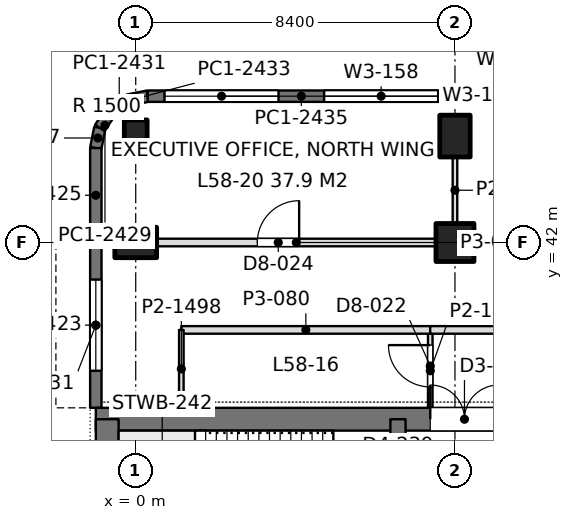
"""IFC4 building model, lengths in metres.
Left out: names, types, materials, properties, quantities, classifications, styles, units other than length and angle.
Written with IfcOpenShell. Run it as: python <this file> out.ifc"""

import sys

from ifc_helpers import new_model, si_unit, direction, frame, frame_2d, origin, origin_2d, place, context, subcontext, project, spatial, rectangle, extrude, element, fill, save


model = new_model("IFC4")
c1 = context("Model", 3, precision=1e-05, world=origin(), true_north=direction((0.0, 1.0)))
c2 = subcontext(c1, "Body", "Model", "MODEL_VIEW")
j1 = project(units=[si_unit("LENGTHUNIT", "METRE"), si_unit("PLANEANGLEUNIT", "RADIAN")], contexts=[c1])
p1 = place(None, origin())
s1 = spatial("IfcSite", under=j1, at=p1, CompositionType="ELEMENT")
p2 = place(p1, origin())
s2 = spatial("IfcBuilding", under=s1, at=p2, CompositionType="ELEMENT")
p3 = place(p2, frame((0.0, 0.0, 254.7)))
s3 = spatial("IfcBuildingStorey", under=s2, at=p3, CompositionType="ELEMENT", Elevation=254.7)
p4 = place(p3, frame((0.0, 42.0, 0.0), z_axis=(0.0, 0.0, 1.0), x_axis=(0.0, 1.0, 0.0)))
e1 = element("IfcColumn", 1, at=p4, inside=s3, PredefinedType="COLUMN", context=c2, shape_type="SweptSolid", body=[
    extrude(rectangle(XDim=0.8, YDim=1.1, at=origin_2d()), origin(), (0.0, 0.0, 1.0), 4.5),
])
p5 = place(p3, frame((0.0, 44.8, 0.0), z_axis=(0.0, 0.0, 1.0), x_axis=(1.0, 0.0, 0.0)))
e2 = element("IfcColumn", 2, at=p5, inside=s3, PredefinedType="COLUMN", context=c2, shape_type="SweptSolid", body=[
    extrude(rectangle(XDim=0.6, YDim=0.85, at=origin_2d()), origin(), (0.0, 0.0, 1.0), 4.5),
])
p6 = place(p3, frame((8.4, 42.0, 0.0), z_axis=(0.0, 0.0, 1.0), x_axis=(1.0, 0.0, 0.0)))
e3 = element("IfcColumn", 3, at=p6, inside=s3, PredefinedType="COLUMN", context=c2, shape_type="SweptSolid", body=[
    extrude(rectangle(XDim=1.0, YDim=1.0, at=origin_2d()), origin(), (0.0, 0.0, 1.0), 4.5),
])
p7 = place(p3, frame((8.4, 44.8, 0.0), z_axis=(0.0, 0.0, 1.0), x_axis=(1.0, 0.0, 0.0)))
e4 = element("IfcColumn", 4, at=p7, inside=s3, PredefinedType="COLUMN", context=c2, shape_type="SweptSolid", body=[
    extrude(rectangle(XDim=0.8, YDim=1.1, at=origin_2d()), origin(), (0.0, 0.0, 1.0), 4.5),
])
p8 = place(p3, frame((-1.05, 37.35, 0.0), z_axis=(0.0, 0.0, 1.0), x_axis=(1.0, 0.0, 0.0)))
e5 = element("IfcWall", 5, at=p8, inside=s3, PredefinedType="SHEAR", context=c2, shape_type="SweptSolid", body=[
    extrude(rectangle(XDim=17.7, YDim=0.6, at=frame_2d((8.85, 0.0))), origin(), (0.0, 0.0, 1.0), 4.5),
])
p9 = place(p8, frame((8.8, 0.0, 0.0)))
e6 = element("IfcOpeningElement", 6, at=p9, cuts=e5, PredefinedType="OPENING", context=c2, shape_type="SweptSolid", body=[
    extrude(rectangle(XDim=1.8, YDim=2.4, at=frame_2d((0.9, 1.2))), frame((0.0, 0.31, 0.0), z_axis=(0.0, -1.0, 0.0), x_axis=(1.0, 0.0, 0.0)), (0.0, 0.0, 1.0), 0.62),
])
p10 = place(p3, frame((-0.75, 13.05, 0.0), z_axis=(0.0, 0.0, 1.0), x_axis=(0.0, 1.0, 0.0)))
e7 = element("IfcWall", 7, at=p10, inside=s3, PredefinedType="SHEAR", context=c2, shape_type="SweptSolid", body=[
    extrude(rectangle(XDim=24.3, YDim=0.6, at=frame_2d((12.15, 0.0))), origin(), (0.0, 0.0, 1.0), 4.5),
])
p11 = place(p3, frame((6.9, 13.05, 0.0), z_axis=(0.0, 0.0, 1.0), x_axis=(0.0, 1.0, 0.0)))
e8 = element("IfcWall", 8, at=p11, inside=s3, PredefinedType="SHEAR", context=c2, shape_type="SweptSolid", body=[
    extrude(rectangle(XDim=24.3, YDim=0.4, at=frame_2d((12.15, 0.0))), origin(), (0.0, 0.0, 1.0), 4.5),
])
p12 = place(p11, frame((1.3, 0.0, 0.0)))
e9 = element("IfcOpeningElement", 9, at=p12, cuts=e8, PredefinedType="OPENING", context=c2, shape_type="SweptSolid", body=[
    extrude(rectangle(XDim=1.0, YDim=2.2, at=frame_2d((0.5, 1.1))), frame((0.0, 0.21, 0.0), z_axis=(0.0, -1.0, 0.0), x_axis=(1.0, 0.0, 0.0)), (0.0, 0.0, 1.0), 0.42),
])
p13 = place(p11, frame((22.0, 0.0, 0.0)))
e10 = element("IfcOpeningElement", 10, at=p13, cuts=e8, PredefinedType="OPENING", context=c2, shape_type="SweptSolid", body=[
    extrude(rectangle(XDim=1.0, YDim=2.2, at=frame_2d((0.5, 1.1))), frame((0.0, 0.21, 0.0), z_axis=(0.0, -1.0, 0.0), x_axis=(1.0, 0.0, 0.0)), (0.0, 0.0, 1.0), 0.42),
])
p14 = place(p11, frame((5.55, 0.0, 0.0)))
e11 = element("IfcOpeningElement", 11, at=p14, cuts=e8, PredefinedType="OPENING", context=c2, shape_type="SweptSolid", body=[
    extrude(rectangle(XDim=1.0, YDim=2.2, at=frame_2d((0.5, 1.1))), frame((0.0, 0.21, 0.0), z_axis=(0.0, -1.0, 0.0), x_axis=(1.0, 0.0, 0.0)), (0.0, 0.0, 1.0), 0.42),
])
p15 = place(p11, frame((9.55, 0.0, 0.0)))
e12 = element("IfcOpeningElement", 12, at=p15, cuts=e8, PredefinedType="OPENING", context=c2, shape_type="SweptSolid", body=[
    extrude(rectangle(XDim=1.0, YDim=2.2, at=frame_2d((0.5, 1.1))), frame((0.0, 0.21, 0.0), z_axis=(0.0, -1.0, 0.0), x_axis=(1.0, 0.0, 0.0)), (0.0, 0.0, 1.0), 0.42),
])
p16 = place(p11, frame((12.8, 0.0, 0.0)))
e13 = element("IfcOpeningElement", 13, at=p16, cuts=e8, PredefinedType="OPENING", context=c2, shape_type="SweptSolid", body=[
    extrude(rectangle(XDim=1.1, YDim=2.2, at=frame_2d((0.55, 1.1))), frame((0.0, 0.21, 0.0), z_axis=(0.0, -1.0, 0.0), x_axis=(1.0, 0.0, 0.0)), (0.0, 0.0, 1.0), 0.42),
])
p17 = place(p11, frame((15.538, 0.0, 0.0)))
e14 = element("IfcOpeningElement", 14, at=p17, cuts=e8, PredefinedType="OPENING", context=c2, shape_type="SweptSolid", body=[
    extrude(rectangle(XDim=1.1, YDim=2.2, at=frame_2d((0.55, 1.1))), frame((0.0, 0.21, 0.0), z_axis=(0.0, -1.0, 0.0), x_axis=(1.0, 0.0, 0.0)), (0.0, 0.0, 1.0), 0.42),
])
p18 = place(p11, frame((18.262, 0.0, 0.0)))
e15 = element("IfcOpeningElement", 15, at=p18, cuts=e8, PredefinedType="OPENING", context=c2, shape_type="SweptSolid", body=[
    extrude(rectangle(XDim=1.1, YDim=2.2, at=frame_2d((0.55, 1.1))), frame((0.0, 0.21, 0.0), z_axis=(0.0, -1.0, 0.0), x_axis=(1.0, 0.0, 0.0)), (0.0, 0.0, 1.0), 0.42),
])
p19 = place(p3, frame((-1.05, 37.65, 0.0), z_axis=(0.0, 0.0, 1.0), x_axis=(0.0, 1.0, 0.0)))
e16 = element("IfcWall", 16, at=p19, inside=s3, PredefinedType="SOLIDWALL", context=c2, shape_type="SweptSolid", body=[
    extrude(rectangle(XDim=4.35, YDim=0.3, at=frame_2d((2.175, 0.0))), origin(), (0.0, 0.0, 1.0), 4.35),
])
p20 = place(p19, frame((0.975, 0.0, 0.9)))
e17 = element("IfcOpeningElement", 17, at=p20, cuts=e16, PredefinedType="OPENING", context=c2, shape_type="SweptSolid", body=[
    extrude(rectangle(XDim=2.4, YDim=1.9, at=frame_2d((1.2, 0.95))), frame((0.0, 0.16, 0.0), z_axis=(0.0, -1.0, 0.0), x_axis=(1.0, 0.0, 0.0)), (0.0, 0.0, 1.0), 0.32),
])
p21 = place(p3, frame((-1.05, 42.0, 0.0), z_axis=(0.0, 0.0, 1.0), x_axis=(0.0, 1.0, 0.0)))
e18 = element("IfcWall", 18, at=p21, inside=s3, PredefinedType="SOLIDWALL", context=c2, shape_type="SweptSolid", body=[
    extrude(rectangle(XDim=2.485, YDim=0.3, at=frame_2d((1.243, 0.0))), origin(), (0.0, 0.0, 1.0), 4.35),
])
p22 = place(p3, frame((-1.05, 44.485, 0.0), z_axis=(0.0, 0.0, 1.0), x_axis=(0.195073962632, 0.980788534345, 0.0)))
e19 = element("IfcWall", 19, at=p22, inside=s3, PredefinedType="SOLIDWALL", context=c2, shape_type="SweptSolid", body=[
    extrude(rectangle(XDim=0.541, YDim=0.3, at=frame_2d((0.271, 0.0))), origin(), (0.0, 0.0, 1.0), 4.35),
])
p23 = place(p3, frame((-0.945, 45.015, 0.0), z_axis=(0.0, 0.0, 1.0), x_axis=(0.55534295404, 0.831621430339, 0.0)))
e20 = element("IfcWall", 20, at=p23, inside=s3, PredefinedType="SOLIDWALL", context=c2, shape_type="SweptSolid", body=[
    extrude(rectangle(XDim=0.526, YDim=0.3, at=frame_2d((0.263, 0.0))), origin(), (0.0, 0.0, 1.0), 4.35),
])
p24 = place(p3, frame((-0.653, 45.453, 0.0), z_axis=(0.0, 0.0, 1.0), x_axis=(0.831692711774, 0.555236195849, 0.0)))
e21 = element("IfcWall", 21, at=p24, inside=s3, PredefinedType="SOLIDWALL", context=c2, shape_type="SweptSolid", body=[
    extrude(rectangle(XDim=0.525, YDim=0.3, at=frame_2d((0.263, 0.0))), origin(), (0.0, 0.0, 1.0), 4.35),
])
p25 = place(p3, frame((-0.216, 45.744, 0.0), z_axis=(0.0, 0.0, 1.0), x_axis=(0.980702050465, 0.1955082817, 0.0)))
e22 = element("IfcWall", 22, at=p25, inside=s3, PredefinedType="SOLIDWALL", context=c2, shape_type="SweptSolid", body=[
    extrude(rectangle(XDim=0.541, YDim=0.3, at=frame_2d((0.271, 0.0))), origin(), (0.0, 0.0, 1.0), 4.35),
])
p26 = place(p3, frame((0.315, 45.85, 0.0), z_axis=(0.0, 0.0, 1.0), x_axis=(1.0, 0.0, 0.0)))
e23 = element("IfcWall", 23, at=p26, inside=s3, PredefinedType="SOLIDWALL", context=c2, shape_type="SweptSolid", body=[
    extrude(rectangle(XDim=8.085, YDim=0.3, at=frame_2d((4.042, 0.0))), origin(), (0.0, 0.0, 1.0), 4.35),
])
p27 = place(p26, frame((0.443, 0.0, 0.9)))
e24 = element("IfcOpeningElement", 24, at=p27, cuts=e23, PredefinedType="OPENING", context=c2, shape_type="SweptSolid", body=[
    extrude(rectangle(XDim=3.0, YDim=2.4, at=frame_2d((1.5, 1.2))), frame((0.0, 0.16, 0.0), z_axis=(0.0, -1.0, 0.0), x_axis=(1.0, 0.0, 0.0)), (0.0, 0.0, 1.0), 0.32),
])
p28 = place(p26, frame((4.643, 0.0, 0.9)))
e25 = element("IfcOpeningElement", 25, at=p28, cuts=e23, PredefinedType="OPENING", context=c2, shape_type="SweptSolid", body=[
    extrude(rectangle(XDim=3.0, YDim=2.4, at=frame_2d((1.5, 1.2))), frame((0.0, 0.16, 0.0), z_axis=(0.0, -1.0, 0.0), x_axis=(1.0, 0.0, 0.0)), (0.0, 0.0, 1.0), 0.32),
])
p29 = place(p3, frame((8.4, 45.85, 0.0), z_axis=(0.0, 0.0, 1.0), x_axis=(1.0, 0.0, 0.0)))
e26 = element("IfcWall", 26, at=p29, inside=s3, PredefinedType="SOLIDWALL", context=c2, shape_type="SweptSolid", body=[
    extrude(rectangle(XDim=8.4, YDim=0.3, at=frame_2d((4.2, 0.0))), origin(), (0.0, 0.0, 1.0), 4.35),
])
p30 = place(p29, frame((0.6, 0.0, 0.9)))
e27 = element("IfcOpeningElement", 27, at=p30, cuts=e26, PredefinedType="OPENING", context=c2, shape_type="SweptSolid", body=[
    extrude(rectangle(XDim=3.0, YDim=2.4, at=frame_2d((1.5, 1.2))), frame((0.0, 0.16, 0.0), z_axis=(0.0, -1.0, 0.0), x_axis=(1.0, 0.0, 0.0)), (0.0, 0.0, 1.0), 0.32),
])
p31 = place(p29, frame((4.8, 0.0, 0.9)))
e28 = element("IfcOpeningElement", 28, at=p31, cuts=e26, PredefinedType="OPENING", context=c2, shape_type="SweptSolid", body=[
    extrude(rectangle(XDim=3.0, YDim=2.4, at=frame_2d((1.5, 1.2))), frame((0.0, 0.16, 0.0), z_axis=(0.0, -1.0, 0.0), x_axis=(1.0, 0.0, 0.0)), (0.0, 0.0, 1.0), 0.32),
])
p32 = place(p3, frame((0.549, 42.0, 0.0), z_axis=(0.0, 0.0, 1.0), x_axis=(1.0, 0.0, 0.0)))
e29 = element("IfcWall", 29, at=p32, inside=s3, PredefinedType="PARTITIONING", context=c2, shape_type="SweptSolid", body=[
    extrude(rectangle(XDim=7.352, YDim=0.2, at=frame_2d((3.676, 0.0))), origin(), (0.0, 0.0, 1.0), 3.8),
])
p33 = place(p32, frame((2.651, 0.0, 0.0)))
e30 = element("IfcOpeningElement", 30, at=p33, cuts=e29, PredefinedType="OPENING", context=c2, shape_type="SweptSolid", body=[
    extrude(rectangle(XDim=1.1, YDim=2.4, at=frame_2d((0.55, 1.2))), frame((0.0, 0.11, 0.0), z_axis=(0.0, -1.0, 0.0), x_axis=(1.0, 0.0, 0.0)), (0.0, 0.0, 1.0), 0.22),
])
p34 = place(p3, frame((8.899, 42.0, 0.0), z_axis=(0.0, 0.0, 1.0), x_axis=(1.0, 0.0, 0.0)))
e31 = element("IfcWall", 31, at=p34, inside=s3, PredefinedType="PARTITIONING", context=c2, shape_type="SweptSolid", body=[
    extrude(rectangle(XDim=7.252, YDim=0.2, at=frame_2d((3.626, 0.0))), origin(), (0.0, 0.0, 1.0), 3.8),
])
p35 = place(p34, frame((3.151, 0.0, 0.0)))
e32 = element("IfcOpeningElement", 32, at=p35, cuts=e31, PredefinedType="OPENING", context=c2, shape_type="SweptSolid", body=[
    extrude(rectangle(XDim=1.1, YDim=2.4, at=frame_2d((0.55, 1.2))), frame((0.0, 0.11, 0.0), z_axis=(0.0, -1.0, 0.0), x_axis=(1.0, 0.0, 0.0)), (0.0, 0.0, 1.0), 0.22),
])
p36 = place(p3, frame((8.4, 42.499, 0.0), z_axis=(0.0, 0.0, 1.0), x_axis=(0.0, 1.0, 0.0)))
e33 = element("IfcWall", 33, at=p36, inside=s3, PredefinedType="PARTITIONING", context=c2, shape_type="SweptSolid", body=[
    extrude(rectangle(XDim=1.752, YDim=0.12, at=frame_2d((0.876, 0.0))), origin(), (0.0, 0.0, 1.0), 3.99),
])
p37 = place(p3, frame((7.748, 39.7, 0.0), z_axis=(0.0, 0.0, 1.0), x_axis=(1.0, 0.0, 0.0)))
e34 = element("IfcWall", 34, at=p37, inside=s3, PredefinedType="PARTITIONING", context=c2, shape_type="SweptSolid", body=[
    extrude(rectangle(XDim=34.904, YDim=0.2, at=frame_2d((17.452, 0.0))), origin(), (0.0, 0.0, 1.0), 3.8),
])
p38 = place(p37, frame((4.919, 0.0, 0.0)))
e35 = element("IfcOpeningElement", 35, at=p38, cuts=e34, PredefinedType="OPENING", context=c2, shape_type="SweptSolid", body=[
    extrude(rectangle(XDim=1.8, YDim=2.2, at=frame_2d((0.9, 1.1))), frame((0.0, 0.11, 0.0), z_axis=(0.0, -1.0, 0.0), x_axis=(1.0, 0.0, 0.0)), (0.0, 0.0, 1.0), 0.22),
])
p39 = place(p37, frame((10.735, 0.0, 0.0)))
e36 = element("IfcOpeningElement", 36, at=p39, cuts=e34, PredefinedType="OPENING", context=c2, shape_type="SweptSolid", body=[
    extrude(rectangle(XDim=1.8, YDim=2.2, at=frame_2d((0.9, 1.1))), frame((0.0, 0.11, 0.0), z_axis=(0.0, -1.0, 0.0), x_axis=(1.0, 0.0, 0.0)), (0.0, 0.0, 1.0), 0.22),
])
p40 = place(p37, frame((22.369, 0.0, 0.0)))
e37 = element("IfcOpeningElement", 37, at=p40, cuts=e34, PredefinedType="OPENING", context=c2, shape_type="SweptSolid", body=[
    extrude(rectangle(XDim=1.8, YDim=2.2, at=frame_2d((0.9, 1.1))), frame((0.0, 0.11, 0.0), z_axis=(0.0, -1.0, 0.0), x_axis=(1.0, 0.0, 0.0)), (0.0, 0.0, 1.0), 0.22),
])
p41 = place(p37, frame((28.185, 0.0, 0.0)))
e38 = element("IfcOpeningElement", 38, at=p41, cuts=e34, PredefinedType="OPENING", context=c2, shape_type="SweptSolid", body=[
    extrude(rectangle(XDim=1.8, YDim=2.2, at=frame_2d((0.9, 1.1))), frame((0.0, 0.11, 0.0), z_axis=(0.0, -1.0, 0.0), x_axis=(1.0, 0.0, 0.0)), (0.0, 0.0, 1.0), 0.22),
])
p42 = place(p3, frame((7.75, 37.648, 0.0), z_axis=(0.0, 0.0, 1.0), x_axis=(0.0, 1.0, 0.0)))
e39 = element("IfcWall", 39, at=p42, inside=s3, PredefinedType="PARTITIONING", context=c2, shape_type="SweptSolid", body=[
    extrude(rectangle(XDim=1.954, YDim=0.12, at=frame_2d((0.977, 0.0))), origin(), (0.0, 0.0, 1.0), 4.35),
])
p43 = place(p42, frame((0.552, 0.0, 0.0)))
e40 = element("IfcOpeningElement", 40, at=p43, cuts=e39, PredefinedType="OPENING", context=c2, shape_type="SweptSolid", body=[
    extrude(rectangle(XDim=1.1, YDim=2.4, at=frame_2d((0.55, 1.2))), frame((0.0, 0.07, 0.0), z_axis=(0.0, -1.0, 0.0), x_axis=(1.0, 0.0, 0.0)), (0.0, 0.0, 1.0), 0.14),
])
p44 = place(p3, frame((1.2, 39.7, 0.0), z_axis=(0.0, 0.0, 1.0), x_axis=(1.0, 0.0, 0.0)))
e41 = element("IfcWall", 41, at=p44, inside=s3, PredefinedType="PARTITIONING", context=c2, shape_type="SweptSolid", body=[
    extrude(rectangle(XDim=6.552, YDim=0.2, at=frame_2d((3.276, 0.0))), origin(), (0.0, 0.0, 1.0), 3.99),
])
p45 = place(p3, frame((1.2, 37.648, 0.0), z_axis=(0.0, 0.0, 1.0), x_axis=(0.0, 1.0, 0.0)))
e42 = element("IfcWall", 42, at=p45, inside=s3, PredefinedType="PARTITIONING", context=c2, shape_type="SweptSolid", body=[
    extrude(rectangle(XDim=2.052, YDim=0.12, at=frame_2d((1.026, 0.0))), origin(), (0.0, 0.0, 1.0), 4.35),
])
p46 = place(p20, origin())
e43 = element("IfcWindow", 43, at=p46, inside=s3, PartitioningType="SINGLE_PANEL", PredefinedType="WINDOW", context=c2, shape_type="SweptSolid", body=[
    extrude(rectangle(XDim=2.4, YDim=1.9, at=frame_2d((1.2, 0.95))), frame((0.0, 0.03, 0.0), z_axis=(0.0, -1.0, 0.0), x_axis=(1.0, 0.0, 0.0)), (0.0, 0.0, 1.0), 0.06),
])
fill(e17, e43)
p47 = place(p27, origin())
e44 = element("IfcWindow", 44, at=p47, inside=s3, PartitioningType="SINGLE_PANEL", PredefinedType="WINDOW", context=c2, shape_type="SweptSolid", body=[
    extrude(rectangle(XDim=3.0, YDim=2.4, at=frame_2d((1.5, 1.2))), frame((0.0, 0.03, 0.0), z_axis=(0.0, -1.0, 0.0), x_axis=(1.0, 0.0, 0.0)), (0.0, 0.0, 1.0), 0.06),
])
fill(e24, e44)
p48 = place(p28, origin())
e45 = element("IfcWindow", 45, at=p48, inside=s3, PartitioningType="SINGLE_PANEL", PredefinedType="WINDOW", context=c2, shape_type="SweptSolid", body=[
    extrude(rectangle(XDim=3.0, YDim=2.4, at=frame_2d((1.5, 1.2))), frame((0.0, 0.03, 0.0), z_axis=(0.0, -1.0, 0.0), x_axis=(1.0, 0.0, 0.0)), (0.0, 0.0, 1.0), 0.06),
])
fill(e25, e45)
p49 = place(p30, origin())
e46 = element("IfcWindow", 46, at=p49, inside=s3, PartitioningType="SINGLE_PANEL", PredefinedType="WINDOW", context=c2, shape_type="SweptSolid", body=[
    extrude(rectangle(XDim=3.0, YDim=2.4, at=frame_2d((1.5, 1.2))), frame((0.0, 0.03, 0.0), z_axis=(0.0, -1.0, 0.0), x_axis=(1.0, 0.0, 0.0)), (0.0, 0.0, 1.0), 0.06),
])
fill(e27, e46)
p50 = place(p9, origin())
e47 = element("IfcDoor", 47, at=p50, inside=s3, OperationType="DOUBLE_DOOR_SINGLE_SWING", PredefinedType="DOOR", context=c2, shape_type="SweptSolid", body=[
    extrude(rectangle(XDim=1.8, YDim=2.4, at=frame_2d((0.9, 1.2))), frame((0.0, 0.025, 0.0), z_axis=(0.0, -1.0, 0.0), x_axis=(1.0, 0.0, 0.0)), (0.0, 0.0, 1.0), 0.05),
])
fill(e6, e47)
p51 = place(p33, origin())
e48 = element("IfcDoor", 48, at=p51, inside=s3, OperationType="SINGLE_SWING_RIGHT", PredefinedType="DOOR", context=c2, shape_type="SweptSolid", body=[
    extrude(rectangle(XDim=1.1, YDim=2.4, at=frame_2d((0.55, 1.2))), frame((0.0, 0.025, 0.0), z_axis=(0.0, -1.0, 0.0), x_axis=(1.0, 0.0, 0.0)), (0.0, 0.0, 1.0), 0.05),
])
fill(e30, e48)
p52 = place(p43, origin())
e49 = element("IfcDoor", 49, at=p52, inside=s3, OperationType="SINGLE_SWING_RIGHT", PredefinedType="DOOR", context=c2, shape_type="SweptSolid", body=[
    extrude(rectangle(XDim=1.1, YDim=2.4, at=frame_2d((0.55, 1.2))), frame((0.0, 0.025, 0.0), z_axis=(0.0, -1.0, 0.0), x_axis=(1.0, 0.0, 0.0)), (0.0, 0.0, 1.0), 0.05),
])
fill(e40, e49)
save(model, sys.argv[1])
